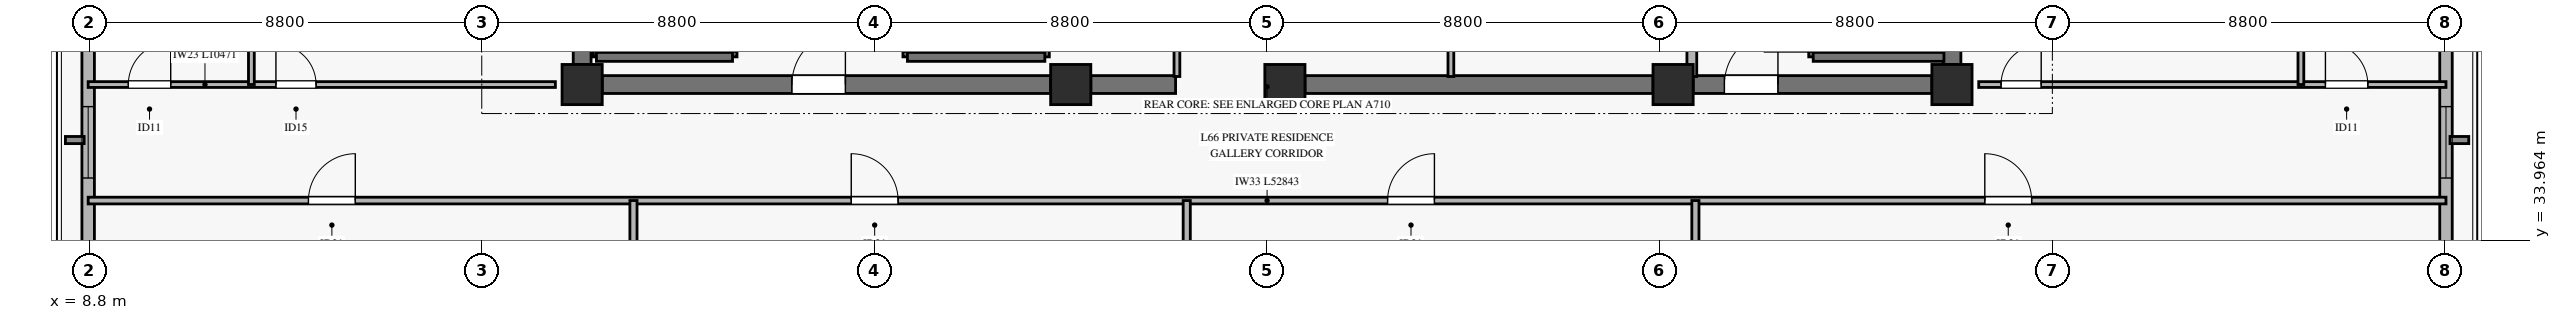
"""IFC4 building model, lengths in metres.
Left out: names, types, materials, properties, quantities, classifications, styles, units other than length and angle.
Written with IfcOpenShell. Run it as: python <this file> out.ifc"""

import sys

from ifc_helpers import new_model, si_unit, direction, frame, frame_2d, origin, origin_2d, place, context, subcontext, project, spatial, rectangle, extrude, source, transform, mapped, element, fill, save


model = new_model("IFC4")
c1 = context("Model", 3, precision=1e-05, world=origin(), true_north=direction((0.0, 1.0)))
c2 = subcontext(c1, "Body", "Model", "MODEL_VIEW")
j1 = project(units=[si_unit("LENGTHUNIT", "METRE"), si_unit("PLANEANGLEUNIT", "RADIAN")], contexts=[c1])
p1 = place(None, origin())
s1 = spatial("IfcSite", under=j1, at=p1, CompositionType="ELEMENT")
p2 = place(p1, origin())
s2 = spatial("IfcBuilding", under=s1, at=p2, CompositionType="ELEMENT")
p3 = place(p2, frame((0.0, 0.0, 258.7)))
s3 = spatial("IfcBuildingStorey", under=s2, at=p3, CompositionType="ELEMENT", Elevation=258.7)
m1 = source(origin(), c2, "Body", "SweptSolid", [
    extrude(rectangle(XDim=0.9, YDim=0.9, at=origin_2d()), origin(), (0.0, 0.0, 1.0), 3.185),
])
for number, where, z_axis, x_axis in (
    (1, (19.85, 37.45, 0.0), (0.0, 0.0, 1.0), (1.0, 0.0, 0.0)),
    (2, (30.8, 37.45, 0.0), (0.0, 0.0, 1.0), (1.0, 0.0, 0.0)),
    (3, (35.6, 37.45, 0.0), (0.0, 0.0, 1.0), (1.0, 0.0, 0.0)),
    (4, (44.3, 37.45, 0.0), (0.0, 0.0, 1.0), (1.0, 0.0, 0.0)),
    (5, (50.55, 37.45, 0.0), (0.0, 0.0, 1.0), (1.0, 0.0, 0.0)),
):
    element("IfcColumn", number, at=place(p3, frame(where, z_axis=z_axis, x_axis=x_axis)), inside=s3, PredefinedType="PILASTER", context=c2, shape_type="MappedRepresentation", body=[
        mapped(m1, transform((0.0, 0.0, 0.0), x_axis=(1.0, 0.0, 0.0), y_axis=(0.0, 1.0, 0.0), z_axis=(0.0, 0.0, 1.0), scale=1.0)),
    ])
p4 = place(p3, frame((20.3, 37.45, 0.0), z_axis=(0.0, 0.0, 1.0), x_axis=(1.0, 0.0, 0.0)))
e6 = element("IfcWall", 6, at=p4, inside=s3, PredefinedType="SHEAR", context=c2, shape_type="SweptSolid", body=[
    extrude(rectangle(XDim=10.05, YDim=0.4, at=frame_2d((5.025, 0.0))), origin(), (0.0, 0.0, 1.0), 3.185),
])
p5 = place(p4, frame((4.25, 0.0, 0.0)))
e7 = element("IfcOpeningElement", 7, at=p5, cuts=e6, PredefinedType="OPENING", context=c2, shape_type="SweptSolid", body=[
    extrude(rectangle(XDim=1.2, YDim=2.15, at=frame_2d((0.6, 1.075))), frame((0.0, 0.21, 0.0), z_axis=(0.0, -1.0, 0.0), x_axis=(1.0, 0.0, 0.0)), (0.0, 0.0, 1.0), 0.42),
])
p6 = place(p3, frame((31.25, 37.45, 0.0), z_axis=(0.0, 0.0, 1.0), x_axis=(1.0, 0.0, 0.0)))
e8 = element("IfcWall", 8, at=p6, inside=s3, PredefinedType="SHEAR", context=c2, shape_type="SweptSolid", body=[
    extrude(rectangle(XDim=1.9, YDim=0.4, at=frame_2d((0.95, 0.0))), origin(), (0.0, 0.0, 1.0), 3.185),
])
p7 = place(p3, frame((36.05, 37.45, 0.0), z_axis=(0.0, 0.0, 1.0), x_axis=(1.0, 0.0, 0.0)))
e9 = element("IfcWall", 9, at=p7, inside=s3, PredefinedType="SHEAR", context=c2, shape_type="SweptSolid", body=[
    extrude(rectangle(XDim=7.8, YDim=0.4, at=frame_2d((3.9, 0.0))), origin(), (0.0, 0.0, 1.0), 3.185),
])
p8 = place(p3, frame((44.75, 37.45, 0.0), z_axis=(0.0, 0.0, 1.0), x_axis=(1.0, 0.0, 0.0)))
e10 = element("IfcWall", 10, at=p8, inside=s3, PredefinedType="SHEAR", context=c2, shape_type="SweptSolid", body=[
    extrude(rectangle(XDim=5.35, YDim=0.4, at=frame_2d((2.675, 0.0))), origin(), (0.0, 0.0, 1.0), 3.185),
])
p9 = place(p8, frame((0.7, 0.0, 0.0)))
e11 = element("IfcOpeningElement", 11, at=p9, cuts=e10, PredefinedType="OPENING", context=c2, shape_type="SweptSolid", body=[
    extrude(rectangle(XDim=1.2, YDim=2.15, at=frame_2d((0.6, 1.075))), frame((0.0, 0.21, 0.0), z_axis=(0.0, -1.0, 0.0), x_axis=(1.0, 0.0, 0.0)), (0.0, 0.0, 1.0), 0.42),
])
for number, where, z_axis, x_axis in (
    (12, (19.85, 37.9, 0.0), (0.0, 0.0, 1.0), (0.0, 1.0, 0.0)),
    (13, (50.55, 37.9, 0.0), (0.0, 0.0, 1.0), (0.0, 1.0, 0.0)),
):
    element("IfcWall", number, at=place(p3, frame(where, z_axis=z_axis, x_axis=x_axis)), inside=s3, PredefinedType="SHEAR", context=c2, shape_type="SweptSolid", body=[
        extrude(rectangle(XDim=8.2, YDim=0.4, at=frame_2d((4.1, 0.0))), origin(), (0.0, 0.0, 1.0), 3.185),
    ])
p10 = place(p3, frame((8.779, 31.322, 0.0), z_axis=(0.0, 0.0, 1.0), x_axis=(0.0, 1.0, 0.0)))
e14 = element("IfcWall", 14, at=p10, inside=s3, PredefinedType="SOLIDWALL", context=c2, shape_type="SweptSolid", body=[
    extrude(rectangle(XDim=12.208, YDim=0.28, at=frame_2d((6.104, 0.0))), origin(), (0.0, 0.0, 1.0), 2.815),
])
p11 = place(p10, frame((4.033, 0.0, 0.45)))
e15 = element("IfcOpeningElement", 15, at=p11, cuts=e14, PredefinedType="OPENING", context=c2, shape_type="SweptSolid", body=[
    extrude(rectangle(XDim=1.6, YDim=2.0, at=frame_2d((0.8, 1.0))), frame((0.0, 0.15, 0.0), z_axis=(0.0, -1.0, 0.0), x_axis=(1.0, 0.0, 0.0)), (0.0, 0.0, 1.0), 0.3),
])
p12 = place(p3, frame((61.622, 31.322, 0.0), z_axis=(0.0, 0.0, 1.0), x_axis=(0.0, 1.0, 0.0)))
e16 = element("IfcWall", 16, at=p12, inside=s3, PredefinedType="SOLIDWALL", context=c2, shape_type="SweptSolid", body=[
    extrude(rectangle(XDim=12.208, YDim=0.28, at=frame_2d((6.104, 0.0))), origin(), (0.0, 0.0, 1.0), 2.815),
])
p13 = place(p12, frame((4.033, 0.0, 0.45)))
e17 = element("IfcOpeningElement", 17, at=p13, cuts=e16, PredefinedType="OPENING", context=c2, shape_type="SweptSolid", body=[
    extrude(rectangle(XDim=1.6, YDim=2.0, at=frame_2d((0.8, 1.0))), frame((0.0, 0.15, 0.0), z_axis=(0.0, -1.0, 0.0), x_axis=(1.0, 0.0, 0.0)), (0.0, 0.0, 1.0), 0.3),
])
p14 = place(p3, frame((20.17, 38.07, 0.0), z_axis=(0.0, 0.0, 1.0), x_axis=(0.0, 1.0, 0.0)))
e18 = element("IfcWall", 18, at=p14, inside=s3, PredefinedType="SOLIDWALL", context=c2, shape_type="SweptSolid", body=[
    extrude(rectangle(XDim=7.25, YDim=0.14, at=frame_2d((3.625, 0.0))), origin(), (0.0, 0.0, 1.0), 3.4),
])
p15 = place(p3, frame((23.22, 38.07, 0.0), z_axis=(0.0, 0.0, 1.0), x_axis=(0.0, 1.0, 0.0)))
e19 = element("IfcWall", 19, at=p15, inside=s3, PredefinedType="SOLIDWALL", context=c2, shape_type="SweptSolid", body=[
    extrude(rectangle(XDim=7.25, YDim=0.2, at=frame_2d((3.625, 0.0))), origin(), (0.0, 0.0, 1.0), 3.4),
])
p16 = place(p15, frame((0.11, 0.0, 0.0)))
e20 = element("IfcOpeningElement", 20, at=p16, cuts=e19, PredefinedType="OPENING", context=c2, shape_type="SweptSolid", body=[
    extrude(rectangle(XDim=1.1, YDim=2.15, at=frame_2d((0.55, 1.075))), frame((0.0, 0.11, 0.0), z_axis=(0.0, -1.0, 0.0), x_axis=(1.0, 0.0, 0.0)), (0.0, 0.0, 1.0), 0.22),
])
p17 = place(p3, frame((20.17, 38.07, 0.0), z_axis=(0.0, 0.0, 1.0), x_axis=(1.0, 0.0, 0.0)))
e21 = element("IfcWall", 21, at=p17, inside=s3, PredefinedType="SOLIDWALL", context=c2, shape_type="SweptSolid", body=[
    extrude(rectangle(XDim=3.05, YDim=0.2, at=frame_2d((1.525, 0.0))), origin(), (0.0, 0.0, 1.0), 3.4),
])
p18 = place(p3, frame((27.14, 38.07, 0.0), z_axis=(0.0, 0.0, 1.0), x_axis=(0.0, 1.0, 0.0)))
e22 = element("IfcWall", 22, at=p18, inside=s3, PredefinedType="SOLIDWALL", context=c2, shape_type="SweptSolid", body=[
    extrude(rectangle(XDim=7.25, YDim=0.2, at=frame_2d((3.625, 0.0))), origin(), (0.0, 0.0, 1.0), 3.4),
])
p19 = place(p18, frame((0.11, 0.0, 0.0)))
e23 = element("IfcOpeningElement", 23, at=p19, cuts=e22, PredefinedType="OPENING", context=c2, shape_type="SweptSolid", body=[
    extrude(rectangle(XDim=1.1, YDim=2.15, at=frame_2d((0.55, 1.075))), frame((0.0, 0.11, 0.0), z_axis=(0.0, -1.0, 0.0), x_axis=(1.0, 0.0, 0.0)), (0.0, 0.0, 1.0), 0.22),
])
p20 = place(p3, frame((30.22, 38.07, 0.0), z_axis=(0.0, 0.0, 1.0), x_axis=(0.0, 1.0, 0.0)))
e24 = element("IfcWall", 24, at=p20, inside=s3, PredefinedType="SOLIDWALL", context=c2, shape_type="SweptSolid", body=[
    extrude(rectangle(XDim=7.25, YDim=0.2, at=frame_2d((3.625, 0.0))), origin(), (0.0, 0.0, 1.0), 3.4),
])
p21 = place(p3, frame((27.14, 38.07, 0.0), z_axis=(0.0, 0.0, 1.0), x_axis=(1.0, 0.0, 0.0)))
e25 = element("IfcWall", 25, at=p21, inside=s3, PredefinedType="SOLIDWALL", context=c2, shape_type="SweptSolid", body=[
    extrude(rectangle(XDim=3.08, YDim=0.2, at=frame_2d((1.54, 0.0))), origin(), (0.0, 0.0, 1.0), 3.4),
])
p22 = place(p3, frame((47.44, 38.07, 0.0), z_axis=(0.0, 0.0, 1.0), x_axis=(0.0, 1.0, 0.0)))
e26 = element("IfcWall", 26, at=p22, inside=s3, PredefinedType="SOLIDWALL", context=c2, shape_type="SweptSolid", body=[
    extrude(rectangle(XDim=7.25, YDim=0.2, at=frame_2d((3.625, 0.0))), origin(), (0.0, 0.0, 1.0), 3.4),
])
p23 = place(p22, frame((0.11, 0.0, 0.0)))
e27 = element("IfcOpeningElement", 27, at=p23, cuts=e26, PredefinedType="OPENING", context=c2, shape_type="SweptSolid", body=[
    extrude(rectangle(XDim=1.1, YDim=2.15, at=frame_2d((0.55, 1.075))), frame((0.0, 0.11, 0.0), z_axis=(0.0, -1.0, 0.0), x_axis=(1.0, 0.0, 0.0)), (0.0, 0.0, 1.0), 0.22),
])
p24 = place(p3, frame((47.44, 38.07, 0.0), z_axis=(0.0, 0.0, 1.0), x_axis=(1.0, 0.0, 0.0)))
e28 = element("IfcWall", 28, at=p24, inside=s3, PredefinedType="SOLIDWALL", context=c2, shape_type="SweptSolid", body=[
    extrude(rectangle(XDim=2.93, YDim=0.2, at=frame_2d((1.465, 0.0))), origin(), (0.0, 0.0, 1.0), 3.4),
])
p25 = place(p3, frame((44.72, 37.63, 0.0), z_axis=(0.0, 0.0, 1.0), x_axis=(0.0, 1.0, 0.0)))
e29 = element("IfcWall", 29, at=p25, inside=s3, PredefinedType="SOLIDWALL", context=c2, shape_type="SweptSolid", body=[
    extrude(rectangle(XDim=7.59, YDim=0.22, at=frame_2d((3.795, 0.0))), origin(), (0.0, 0.0, 1.0), 3.185),
])
p26 = place(p3, frame((33.18, 37.63, 0.0), z_axis=(0.0, 0.0, 1.0), x_axis=(0.0, 1.0, 0.0)))
e30 = element("IfcWall", 30, at=p26, inside=s3, PredefinedType="PARTITIONING", context=c2, shape_type="SweptSolid", body=[
    extrude(rectangle(XDim=6.52, YDim=0.13, at=frame_2d((3.26, 0.0))), origin(), (0.0, 0.0, 1.0), 2.27),
])
p27 = place(p26, frame((2.27, 0.0, 0.0)))
e31 = element("IfcOpeningElement", 31, at=p27, cuts=e30, PredefinedType="OPENING", context=c2, shape_type="SweptSolid", body=[
    extrude(rectangle(XDim=0.9, YDim=2.1, at=frame_2d((0.45, 1.05))), frame((0.0, 0.075, 0.0), z_axis=(0.0, -1.0, 0.0), x_axis=(1.0, 0.0, 0.0)), (0.0, 0.0, 1.0), 0.15),
])
p28 = place(p3, frame((39.32, 37.63, 0.0), z_axis=(0.0, 0.0, 1.0), x_axis=(0.0, 1.0, 0.0)))
e32 = element("IfcWall", 32, at=p28, inside=s3, PredefinedType="PARTITIONING", context=c2, shape_type="SweptSolid", body=[
    extrude(rectangle(XDim=8.74, YDim=0.13, at=frame_2d((4.37, 0.0))), origin(), (0.0, 0.0, 1.0), 3.185),
])
p29 = place(p28, frame((4.89, 0.0, 0.0)))
e33 = element("IfcOpeningElement", 33, at=p29, cuts=e32, PredefinedType="OPENING", context=c2, shape_type="SweptSolid", body=[
    extrude(rectangle(XDim=0.9, YDim=2.1, at=frame_2d((0.45, 1.05))), frame((0.0, 0.075, 0.0), z_axis=(0.0, -1.0, 0.0), x_axis=(1.0, 0.0, 0.0)), (0.0, 0.0, 1.0), 0.15),
])
p30 = place(p3, frame((8.779, 34.85, 0.0), z_axis=(0.0, 0.0, 1.0), x_axis=(1.0, 0.0, 0.0)))
e34 = element("IfcWall", 34, at=p30, inside=s3, PredefinedType="PARTITIONING", context=c2, shape_type="SweptSolid", body=[
    extrude(rectangle(XDim=52.843, YDim=0.15, at=frame_2d((26.421, 0.0))), origin(), (0.0, 0.0, 1.0), 2.47),
])
p31 = place(p30, frame((4.937, 0.0, 0.0)))
e35 = element("IfcOpeningElement", 35, at=p31, cuts=e34, PredefinedType="OPENING", context=c2, shape_type="SweptSolid", body=[
    extrude(rectangle(XDim=1.05, YDim=2.15, at=frame_2d((0.525, 1.075))), frame((0.0, 0.085, 0.0), z_axis=(0.0, -1.0, 0.0), x_axis=(1.0, 0.0, 0.0)), (0.0, 0.0, 1.0), 0.17),
])
p32 = place(p30, frame((17.102, 0.0, 0.0)))
e36 = element("IfcOpeningElement", 36, at=p32, cuts=e34, PredefinedType="OPENING", context=c2, shape_type="SweptSolid", body=[
    extrude(rectangle(XDim=1.05, YDim=2.15, at=frame_2d((0.525, 1.075))), frame((0.0, 0.085, 0.0), z_axis=(0.0, -1.0, 0.0), x_axis=(1.0, 0.0, 0.0)), (0.0, 0.0, 1.0), 0.17),
])
p33 = place(p30, frame((29.122, 0.0, 0.0)))
e37 = element("IfcOpeningElement", 37, at=p33, cuts=e34, PredefinedType="OPENING", context=c2, shape_type="SweptSolid", body=[
    extrude(rectangle(XDim=1.05, YDim=2.15, at=frame_2d((0.525, 1.075))), frame((0.0, 0.085, 0.0), z_axis=(0.0, -1.0, 0.0), x_axis=(1.0, 0.0, 0.0)), (0.0, 0.0, 1.0), 0.17),
])
p34 = place(p30, frame((42.507, 0.0, 0.0)))
e38 = element("IfcOpeningElement", 38, at=p34, cuts=e34, PredefinedType="OPENING", context=c2, shape_type="SweptSolid", body=[
    extrude(rectangle(XDim=1.05, YDim=2.15, at=frame_2d((0.525, 1.075))), frame((0.0, 0.085, 0.0), z_axis=(0.0, -1.0, 0.0), x_axis=(1.0, 0.0, 0.0)), (0.0, 0.0, 1.0), 0.17),
])
for number, where, z_axis, x_axis in (
    (39, (21.0, 16.045, 0.0), (0.0, 0.0, 1.0), (0.0, 1.0, 0.0)),
    (40, (33.4, 16.045, 0.0), (0.0, 0.0, 1.0), (0.0, 1.0, 0.0)),
    (41, (44.8, 16.045, 0.0), (0.0, 0.0, 1.0), (0.0, 1.0, 0.0)),
):
    element("IfcWall", number, at=place(p3, frame(where, z_axis=z_axis, x_axis=x_axis)), inside=s3, PredefinedType="PARTITIONING", context=c2, shape_type="SweptSolid", body=[
        extrude(rectangle(XDim=18.805, YDim=0.16, at=frame_2d((9.403, 0.0))), origin(), (0.0, 0.0, 1.0), 2.77),
    ])
p35 = place(p3, frame((8.779, 37.45, 0.0), z_axis=(0.0, 0.0, 1.0), x_axis=(1.0, 0.0, 0.0)))
e42 = element("IfcWall", 42, at=p35, inside=s3, PredefinedType="PARTITIONING", context=c2, shape_type="SweptSolid", body=[
    extrude(rectangle(XDim=10.471, YDim=0.13, at=frame_2d((5.235, 0.0))), origin(), (0.0, 0.0, 1.0), 2.82),
])
p36 = place(p35, frame((0.9, 0.0, 0.0)))
e43 = element("IfcOpeningElement", 43, at=p36, cuts=e42, PredefinedType="OPENING", context=c2, shape_type="SweptSolid", body=[
    extrude(rectangle(XDim=0.95, YDim=2.1, at=frame_2d((0.475, 1.05))), frame((0.0, 0.075, 0.0), z_axis=(0.0, -1.0, 0.0), x_axis=(1.0, 0.0, 0.0)), (0.0, 0.0, 1.0), 0.15),
])
p37 = place(p35, frame((4.208, 0.0, 0.0)))
e44 = element("IfcOpeningElement", 44, at=p37, cuts=e42, PredefinedType="OPENING", context=c2, shape_type="SweptSolid", body=[
    extrude(rectangle(XDim=0.9, YDim=2.1, at=frame_2d((0.45, 1.05))), frame((0.0, 0.075, 0.0), z_axis=(0.0, -1.0, 0.0), x_axis=(1.0, 0.0, 0.0)), (0.0, 0.0, 1.0), 0.15),
])
p38 = place(p3, frame((12.437, 37.45, 0.0), z_axis=(0.0, 0.0, 1.0), x_axis=(0.0, 1.0, 0.0)))
e45 = element("IfcWall", 45, at=p38, inside=s3, PredefinedType="PARTITIONING", context=c2, shape_type="SweptSolid", body=[
    extrude(rectangle(XDim=8.8, YDim=0.13, at=frame_2d((4.4, 0.0))), origin(), (0.0, 0.0, 1.0), 3.185),
])
p39 = place(p3, frame((51.15, 37.45, 0.0), z_axis=(0.0, 0.0, 1.0), x_axis=(1.0, 0.0, 0.0)))
e46 = element("IfcWall", 46, at=p39, inside=s3, PredefinedType="PARTITIONING", context=c2, shape_type="SweptSolid", body=[
    extrude(rectangle(XDim=10.472, YDim=0.13, at=frame_2d((5.236, 0.0))), origin(), (0.0, 0.0, 1.0), 2.82),
])
p40 = place(p39, frame((0.5, 0.0, 0.0)))
e47 = element("IfcOpeningElement", 47, at=p40, cuts=e46, PredefinedType="OPENING", context=c2, shape_type="SweptSolid", body=[
    extrude(rectangle(XDim=0.9, YDim=2.1, at=frame_2d((0.45, 1.05))), frame((0.0, 0.075, 0.0), z_axis=(0.0, -1.0, 0.0), x_axis=(1.0, 0.0, 0.0)), (0.0, 0.0, 1.0), 0.15),
])
p41 = place(p39, frame((7.77, 0.0, 0.0)))
e48 = element("IfcOpeningElement", 48, at=p41, cuts=e46, PredefinedType="OPENING", context=c2, shape_type="SweptSolid", body=[
    extrude(rectangle(XDim=0.95, YDim=2.1, at=frame_2d((0.475, 1.05))), frame((0.0, 0.075, 0.0), z_axis=(0.0, -1.0, 0.0), x_axis=(1.0, 0.0, 0.0)), (0.0, 0.0, 1.0), 0.15),
])
p42 = place(p3, frame((58.37, 37.45, 0.0), z_axis=(0.0, 0.0, 1.0), x_axis=(0.0, 1.0, 0.0)))
e49 = element("IfcWall", 49, at=p42, inside=s3, PredefinedType="PARTITIONING", context=c2, shape_type="SweptSolid", body=[
    extrude(rectangle(XDim=8.8, YDim=0.13, at=frame_2d((4.4, 0.0))), origin(), (0.0, 0.0, 1.0), 3.185),
])
m2 = source(origin(), c2, "Body", "SweptSolid", [
    extrude(rectangle(XDim=1.6, YDim=2.0, at=frame_2d((0.8, 1.0))), frame((0.0, 0.03, 0.0), z_axis=(0.0, -1.0, 0.0), x_axis=(1.0, 0.0, 0.0)), (0.0, 0.0, 1.0), 0.06),
])
p43 = place(p11, origin())
e50 = element("IfcWindow", 50, at=p43, inside=s3, PartitioningType="SINGLE_PANEL", PredefinedType="WINDOW", context=c2, shape_type="MappedRepresentation", body=[
    mapped(m2, transform((0.0, 0.0, 0.0), x_axis=(1.0, 0.0, 0.0), y_axis=(0.0, 1.0, 0.0), z_axis=(0.0, 0.0, 1.0), scale=1.0)),
])
fill(e15, e50)
p44 = place(p13, origin())
e51 = element("IfcWindow", 51, at=p44, inside=s3, PartitioningType="SINGLE_PANEL", PredefinedType="WINDOW", context=c2, shape_type="MappedRepresentation", body=[
    mapped(m2, transform((0.0, 0.0, 0.0), x_axis=(1.0, 0.0, 0.0), y_axis=(0.0, 1.0, 0.0), z_axis=(0.0, 0.0, 1.0), scale=1.0)),
])
fill(e17, e51)
m3 = source(origin(), c2, "Body", "SweptSolid", [
    extrude(rectangle(XDim=1.2, YDim=2.15, at=frame_2d((0.6, 1.075))), frame((0.0, 0.025, 0.0), z_axis=(0.0, -1.0, 0.0), x_axis=(1.0, 0.0, 0.0)), (0.0, 0.0, 1.0), 0.05),
])
p45 = place(p5, origin())
e52 = element("IfcDoor", 52, at=p45, inside=s3, OperationType="SINGLE_SWING_RIGHT", PredefinedType="DOOR", context=c2, shape_type="MappedRepresentation", body=[
    mapped(m3, transform((0.0, 0.0, 0.0), x_axis=(1.0, 0.0, 0.0), y_axis=(0.0, 1.0, 0.0), z_axis=(0.0, 0.0, 1.0), scale=1.0)),
])
fill(e7, e52)
p46 = place(p9, origin())
e53 = element("IfcDoor", 53, at=p46, inside=s3, OperationType="SINGLE_SWING_RIGHT", PredefinedType="DOOR", context=c2, shape_type="MappedRepresentation", body=[
    mapped(m3, transform((0.0, 0.0, 0.0), x_axis=(1.0, 0.0, 0.0), y_axis=(0.0, 1.0, 0.0), z_axis=(0.0, 0.0, 1.0), scale=1.0)),
])
fill(e11, e53)
m4 = source(origin(), c2, "Body", "SweptSolid", [
    extrude(rectangle(XDim=1.05, YDim=2.15, at=frame_2d((0.525, 1.075))), frame((0.0, 0.025, 0.0), z_axis=(0.0, -1.0, 0.0), x_axis=(1.0, 0.0, 0.0)), (0.0, 0.0, 1.0), 0.05),
])
p47 = place(p31, origin())
e54 = element("IfcDoor", 54, at=p47, inside=s3, OperationType="SINGLE_SWING_RIGHT", PredefinedType="DOOR", context=c2, shape_type="MappedRepresentation", body=[
    mapped(m4, transform((0.0, 0.0, 0.0), x_axis=(1.0, 0.0, 0.0), y_axis=(0.0, 1.0, 0.0), z_axis=(0.0, 0.0, 1.0), scale=1.0)),
])
fill(e35, e54)
p48 = place(p32, origin())
e55 = element("IfcDoor", 55, at=p48, inside=s3, OperationType="SINGLE_SWING_LEFT", PredefinedType="DOOR", context=c2, shape_type="MappedRepresentation", body=[
    mapped(m4, transform((0.0, 0.0, 0.0), x_axis=(1.0, 0.0, 0.0), y_axis=(0.0, 1.0, 0.0), z_axis=(0.0, 0.0, 1.0), scale=1.0)),
])
fill(e36, e55)
p49 = place(p33, origin())
e56 = element("IfcDoor", 56, at=p49, inside=s3, OperationType="SINGLE_SWING_RIGHT", PredefinedType="DOOR", context=c2, shape_type="MappedRepresentation", body=[
    mapped(m4, transform((0.0, 0.0, 0.0), x_axis=(1.0, 0.0, 0.0), y_axis=(0.0, 1.0, 0.0), z_axis=(0.0, 0.0, 1.0), scale=1.0)),
])
fill(e37, e56)
p50 = place(p34, origin())
e57 = element("IfcDoor", 57, at=p50, inside=s3, OperationType="SINGLE_SWING_LEFT", PredefinedType="DOOR", context=c2, shape_type="MappedRepresentation", body=[
    mapped(m4, transform((0.0, 0.0, 0.0), x_axis=(1.0, 0.0, 0.0), y_axis=(0.0, 1.0, 0.0), z_axis=(0.0, 0.0, 1.0), scale=1.0)),
])
fill(e38, e57)
m5 = source(origin(), c2, "Body", "SweptSolid", [
    extrude(rectangle(XDim=0.95, YDim=2.1, at=frame_2d((0.475, 1.05))), frame((0.0, 0.025, 0.0), z_axis=(0.0, -1.0, 0.0), x_axis=(1.0, 0.0, 0.0)), (0.0, 0.0, 1.0), 0.05),
])
p51 = place(p36, origin())
e58 = element("IfcDoor", 58, at=p51, inside=s3, OperationType="SINGLE_SWING_RIGHT", PredefinedType="DOOR", context=c2, shape_type="MappedRepresentation", body=[
    mapped(m5, transform((0.0, 0.0, 0.0), x_axis=(1.0, 0.0, 0.0), y_axis=(0.0, 1.0, 0.0), z_axis=(0.0, 0.0, 1.0), scale=1.0)),
])
fill(e43, e58)
m6 = source(origin(), c2, "Body", "SweptSolid", [
    extrude(rectangle(XDim=0.9, YDim=2.1, at=frame_2d((0.45, 1.05))), frame((0.0, 0.025, 0.0), z_axis=(0.0, -1.0, 0.0), x_axis=(1.0, 0.0, 0.0)), (0.0, 0.0, 1.0), 0.05),
])
p52 = place(p37, origin())
e59 = element("IfcDoor", 59, at=p52, inside=s3, OperationType="SINGLE_SWING_LEFT", PredefinedType="DOOR", context=c2, shape_type="MappedRepresentation", body=[
    mapped(m6, transform((0.0, 0.0, 0.0), x_axis=(1.0, 0.0, 0.0), y_axis=(0.0, 1.0, 0.0), z_axis=(0.0, 0.0, 1.0), scale=1.0)),
])
fill(e44, e59)
p53 = place(p40, origin())
e60 = element("IfcDoor", 60, at=p53, inside=s3, OperationType="SINGLE_SWING_RIGHT", PredefinedType="DOOR", context=c2, shape_type="MappedRepresentation", body=[
    mapped(m6, transform((0.0, 0.0, 0.0), x_axis=(1.0, 0.0, 0.0), y_axis=(0.0, 1.0, 0.0), z_axis=(0.0, 0.0, 1.0), scale=1.0)),
])
fill(e47, e60)
p54 = place(p41, origin())
e61 = element("IfcDoor", 61, at=p54, inside=s3, OperationType="SINGLE_SWING_LEFT", PredefinedType="DOOR", context=c2, shape_type="MappedRepresentation", body=[
    mapped(m5, transform((0.0, 0.0, 0.0), x_axis=(1.0, 0.0, 0.0), y_axis=(0.0, 1.0, 0.0), z_axis=(0.0, 0.0, 1.0), scale=1.0)),
])
fill(e48, e61)
save(model, sys.argv[1])
